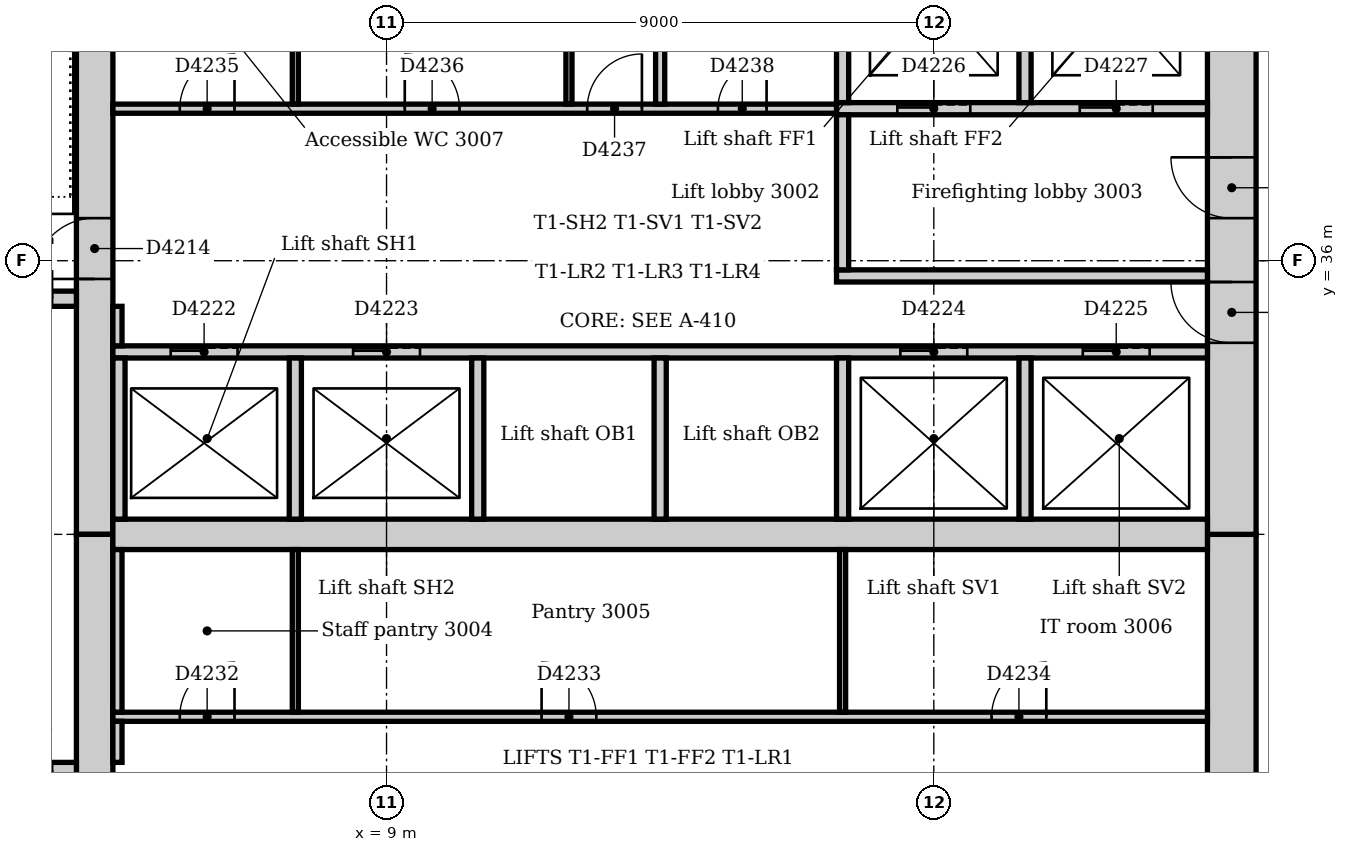
"""IFC4 building model, lengths in metres.
Left out: names, types, materials, properties, quantities, classifications, styles, units other than length and angle.
Written with IfcOpenShell. Run it as: python <this file> out.ifc"""

import sys

from ifc_helpers import new_model, si_unit, direction, frame, frame_2d, origin, place, context, subcontext, project, spatial, rectangle, extrude, element, fill, save


model = new_model("IFC4")
c1 = context("Model", 3, precision=1e-05, world=origin(), true_north=direction((0.0, 1.0)))
c2 = subcontext(c1, "Body", "Model", "MODEL_VIEW")
j1 = project(units=[si_unit("LENGTHUNIT", "METRE"), si_unit("PLANEANGLEUNIT", "RADIAN")], contexts=[c1])
p1 = place(None, origin())
s1 = spatial("IfcSite", under=j1, at=p1, CompositionType="ELEMENT")
p2 = place(p1, origin())
s2 = spatial("IfcBuilding", under=s1, at=p2, CompositionType="ELEMENT")
p3 = place(p2, frame((0.0, 0.0, 128.0)))
s3 = spatial("IfcBuildingStorey", under=s2, at=p3, CompositionType="ELEMENT", Elevation=128.0)
p4 = place(p3, frame((22.9, 21.0, 0.0), z_axis=(0.0, 0.0, 1.0), x_axis=(0.0, 1.0, 0.0)))
e1 = element("IfcWall", 1, at=p4, inside=s3, PredefinedType="SOLIDWALL", context=c2, shape_type="SweptSolid", body=[
    extrude(rectangle(XDim=10.5, YDim=0.8, at=frame_2d((5.25, 0.0))), origin(), (0.0, 0.0, 1.0), 4.0),
])
p5 = place(p4, frame((4.35, 0.0, 0.0)))
e2 = element("IfcOpeningElement", 2, at=p5, cuts=e1, PredefinedType="OPENING", context=c2, shape_type="SweptSolid", body=[
    extrude(rectangle(XDim=1.8, YDim=2.1, at=frame_2d((0.9, 1.05))), frame((0.0, 0.41, 0.0), z_axis=(0.0, -1.0, 0.0), x_axis=(1.0, 0.0, 0.0)), (0.0, 0.0, 1.0), 0.82),
])
p6 = place(p3, frame((22.9, 31.5, 0.0), z_axis=(0.0, 0.0, 1.0), x_axis=(0.0, 1.0, 0.0)))
e3 = element("IfcWall", 3, at=p6, inside=s3, PredefinedType="SOLIDWALL", context=c2, shape_type="SweptSolid", body=[
    extrude(rectangle(XDim=10.5, YDim=0.8, at=frame_2d((5.25, 0.0))), origin(), (0.0, 0.0, 1.0), 4.0),
])
p7 = place(p6, frame((3.15, 0.0, 0.0)))
e4 = element("IfcOpeningElement", 4, at=p7, cuts=e3, PredefinedType="OPENING", context=c2, shape_type="SweptSolid", body=[
    extrude(rectangle(XDim=1.0, YDim=2.1, at=frame_2d((0.5, 1.05))), frame((0.0, 0.41, 0.0), z_axis=(0.0, -1.0, 0.0), x_axis=(1.0, 0.0, 0.0)), (0.0, 0.0, 1.0), 0.82),
])
p8 = place(p6, frame((5.2, 0.0, 0.0)))
e5 = element("IfcOpeningElement", 5, at=p8, cuts=e3, PredefinedType="OPENING", context=c2, shape_type="SweptSolid", body=[
    extrude(rectangle(XDim=1.0, YDim=2.1, at=frame_2d((0.5, 1.05))), frame((0.0, 0.41, 0.0), z_axis=(0.0, -1.0, 0.0), x_axis=(1.0, 0.0, 0.0)), (0.0, 0.0, 1.0), 0.82),
])
p9 = place(p3, frame((4.2, 42.0, 0.0), z_axis=(0.0, 0.0, 1.0), x_axis=(0.0, -1.0, 0.0)))
e6 = element("IfcWall", 6, at=p9, inside=s3, PredefinedType="SOLIDWALL", context=c2, shape_type="SweptSolid", body=[
    extrude(rectangle(XDim=10.5, YDim=0.6, at=frame_2d((5.25, 0.0))), origin(), (0.0, 0.0, 1.0), 4.0),
])
p10 = place(p9, frame((5.3, 0.0, 0.0)))
e7 = element("IfcOpeningElement", 7, at=p10, cuts=e6, PredefinedType="OPENING", context=c2, shape_type="SweptSolid", body=[
    extrude(rectangle(XDim=1.0, YDim=2.1, at=frame_2d((0.5, 1.05))), frame((0.0, 0.31, 0.0), z_axis=(0.0, -1.0, 0.0), x_axis=(1.0, 0.0, 0.0)), (0.0, 0.0, 1.0), 0.62),
])
p11 = place(p3, frame((4.2, 31.5, 0.0), z_axis=(0.0, 0.0, 1.0), x_axis=(0.0, -1.0, 0.0)))
e8 = element("IfcWall", 8, at=p11, inside=s3, PredefinedType="SOLIDWALL", context=c2, shape_type="SweptSolid", body=[
    extrude(rectangle(XDim=10.5, YDim=0.6, at=frame_2d((5.25, 0.0))), origin(), (0.0, 0.0, 1.0), 4.0),
])
p12 = place(p11, frame((4.25, 0.0, 0.0)))
e9 = element("IfcOpeningElement", 9, at=p12, cuts=e8, PredefinedType="OPENING", context=c2, shape_type="SweptSolid", body=[
    extrude(rectangle(XDim=1.0, YDim=2.1, at=frame_2d((0.5, 1.05))), frame((0.0, 0.31, 0.0), z_axis=(0.0, -1.0, 0.0), x_axis=(1.0, 0.0, 0.0)), (0.0, 0.0, 1.0), 0.62),
])
p13 = place(p3, frame((4.5, 31.5, 0.0), z_axis=(0.0, 0.0, 1.0), x_axis=(1.0, 0.0, 0.0)))
e10 = element("IfcWall", 10, at=p13, inside=s3, PredefinedType="SOLIDWALL", context=c2, shape_type="SweptSolid", body=[
    extrude(rectangle(XDim=18.0, YDim=0.5, at=frame_2d((9.0, 0.0))), origin(), (0.0, 0.0, 1.0), 4.0),
])
p14 = place(p3, frame((3.9, 27.625, 0.0), z_axis=(0.0, 0.0, 1.0), x_axis=(-1.0, 0.0, 0.0)))
e11 = element("IfcWall", 11, at=p14, inside=s3, PredefinedType="SOLIDWALL", context=c2, shape_type="SweptSolid", body=[
    extrude(rectangle(XDim=3.54, YDim=0.25, at=frame_2d((1.77, 0.0))), origin(), (0.0, 0.0, 1.0), 4.0),
])
p15 = place(p14, frame((0.4, 0.0, 0.0)))
e12 = element("IfcOpeningElement", 12, at=p15, cuts=e11, PredefinedType="OPENING", context=c2, shape_type="SweptSolid", body=[
    extrude(rectangle(XDim=1.0, YDim=2.1, at=frame_2d((0.5, 1.05))), frame((0.0, 0.135, 0.0), z_axis=(0.0, -1.0, 0.0), x_axis=(1.0, 0.0, 0.0)), (0.0, 0.0, 1.0), 0.27),
])
p16 = place(p3, frame((0.36, 35.375, 0.0), z_axis=(0.0, 0.0, 1.0), x_axis=(1.0, 0.0, 0.0)))
e13 = element("IfcWall", 13, at=p16, inside=s3, PredefinedType="SOLIDWALL", context=c2, shape_type="SweptSolid", body=[
    extrude(rectangle(XDim=3.54, YDim=0.25, at=frame_2d((1.77, 0.0))), origin(), (0.0, 0.0, 1.0), 4.0),
])
p17 = place(p16, frame((2.14, 0.0, 0.0)))
e14 = element("IfcOpeningElement", 14, at=p17, cuts=e13, PredefinedType="OPENING", context=c2, shape_type="SweptSolid", body=[
    extrude(rectangle(XDim=1.0, YDim=2.1, at=frame_2d((0.5, 1.05))), frame((0.0, 0.135, 0.0), z_axis=(0.0, -1.0, 0.0), x_axis=(1.0, 0.0, 0.0)), (0.0, 0.0, 1.0), 0.27),
])
p18 = place(p3, frame((16.4, 35.75, 0.0), z_axis=(0.0, 0.0, 1.0), x_axis=(1.0, 0.0, 0.0)))
e15 = element("IfcWall", 15, at=p18, inside=s3, PredefinedType="PARTITIONING", context=c2, shape_type="SweptSolid", body=[
    extrude(rectangle(XDim=6.1, YDim=0.2, at=frame_2d((3.05, 0.0))), origin(), (0.0, 0.0, 1.0), 3.85),
])
p19 = place(p3, frame((16.4, 38.5, 0.0), z_axis=(0.0, 0.0, 1.0), x_axis=(1.0, 0.0, 0.0)))
e16 = element("IfcWall", 16, at=p19, inside=s3, PredefinedType="PARTITIONING", context=c2, shape_type="SweptSolid", body=[
    extrude(rectangle(XDim=6.1, YDim=0.2, at=frame_2d((3.05, 0.0))), origin(), (0.0, 0.0, 1.0), 3.85),
])
p20 = place(p19, frame((1.0, 0.0, 0.0)))
e17 = element("IfcOpeningElement", 17, at=p20, cuts=e16, PredefinedType="OPENING", context=c2, shape_type="SweptSolid", body=[
    extrude(rectangle(XDim=1.2, YDim=2.1, at=frame_2d((0.6, 1.05))), frame((0.0, 0.11, 0.0), z_axis=(0.0, -1.0, 0.0), x_axis=(1.0, 0.0, 0.0)), (0.0, 0.0, 1.0), 0.22),
])
p21 = place(p19, frame((4.0, 0.0, 0.0)))
e18 = element("IfcOpeningElement", 18, at=p21, cuts=e16, PredefinedType="OPENING", context=c2, shape_type="SweptSolid", body=[
    extrude(rectangle(XDim=1.2, YDim=2.1, at=frame_2d((0.6, 1.05))), frame((0.0, 0.11, 0.0), z_axis=(0.0, -1.0, 0.0), x_axis=(1.0, 0.0, 0.0)), (0.0, 0.0, 1.0), 0.22),
])
p22 = place(p3, frame((16.5, 35.85, 0.0), z_axis=(0.0, 0.0, 1.0), x_axis=(0.0, 1.0, 0.0)))
e19 = element("IfcWall", 19, at=p22, inside=s3, PredefinedType="PARTITIONING", context=c2, shape_type="SweptSolid", body=[
    extrude(rectangle(XDim=2.55, YDim=0.2, at=frame_2d((1.275, 0.0))), origin(), (0.0, 0.0, 1.0), 3.85),
])
p23 = place(p3, frame((4.5, 34.5, 0.0), z_axis=(0.0, 0.0, 1.0), x_axis=(1.0, 0.0, 0.0)))
e20 = element("IfcWall", 20, at=p23, inside=s3, PredefinedType="PARTITIONING", context=c2, shape_type="SweptSolid", body=[
    extrude(rectangle(XDim=18.0, YDim=0.2, at=frame_2d((9.0, 0.0))), origin(), (0.0, 0.0, 1.0), 3.85),
])
p24 = place(p23, frame((0.95, 0.0, 0.0)))
e21 = element("IfcOpeningElement", 21, at=p24, cuts=e20, PredefinedType="OPENING", context=c2, shape_type="SweptSolid", body=[
    extrude(rectangle(XDim=1.1, YDim=2.1, at=frame_2d((0.55, 1.05))), frame((0.0, 0.11, 0.0), z_axis=(0.0, -1.0, 0.0), x_axis=(1.0, 0.0, 0.0)), (0.0, 0.0, 1.0), 0.22),
])
p25 = place(p23, frame((3.95, 0.0, 0.0)))
e22 = element("IfcOpeningElement", 22, at=p25, cuts=e20, PredefinedType="OPENING", context=c2, shape_type="SweptSolid", body=[
    extrude(rectangle(XDim=1.1, YDim=2.1, at=frame_2d((0.55, 1.05))), frame((0.0, 0.11, 0.0), z_axis=(0.0, -1.0, 0.0), x_axis=(1.0, 0.0, 0.0)), (0.0, 0.0, 1.0), 0.22),
])
p26 = place(p23, frame((12.95, 0.0, 0.0)))
e23 = element("IfcOpeningElement", 23, at=p26, cuts=e20, PredefinedType="OPENING", context=c2, shape_type="SweptSolid", body=[
    extrude(rectangle(XDim=1.1, YDim=2.1, at=frame_2d((0.55, 1.05))), frame((0.0, 0.11, 0.0), z_axis=(0.0, -1.0, 0.0), x_axis=(1.0, 0.0, 0.0)), (0.0, 0.0, 1.0), 0.22),
])
p27 = place(p23, frame((15.95, 0.0, 0.0)))
e24 = element("IfcOpeningElement", 24, at=p27, cuts=e20, PredefinedType="OPENING", context=c2, shape_type="SweptSolid", body=[
    extrude(rectangle(XDim=1.1, YDim=2.1, at=frame_2d((0.55, 1.05))), frame((0.0, 0.11, 0.0), z_axis=(0.0, -1.0, 0.0), x_axis=(1.0, 0.0, 0.0)), (0.0, 0.0, 1.0), 0.22),
])
for number, where, z_axis, x_axis in (
    (25, (16.5, 38.6, 0.0), (0.0, 0.0, 1.0), (0.0, 1.0, 0.0)),
    (26, (19.5, 38.6, 0.0), (0.0, 0.0, 1.0), (0.0, 1.0, 0.0)),
):
    element("IfcWall", number, at=place(p3, frame(where, z_axis=z_axis, x_axis=x_axis)), inside=s3, PredefinedType="PARTITIONING", context=c2, shape_type="SweptSolid", body=[
        extrude(rectangle(XDim=3.4, YDim=0.2, at=frame_2d((1.7, 0.0))), origin(), (0.0, 0.0, 1.0), 3.85),
    ])
for number, where, z_axis, x_axis in (
    (27, (4.6, 31.75, 0.0), (0.0, 0.0, 1.0), (0.0, 1.0, 0.0)),
    (28, (7.5, 31.75, 0.0), (0.0, 0.0, 1.0), (0.0, 1.0, 0.0)),
    (29, (10.5, 31.75, 0.0), (0.0, 0.0, 1.0), (0.0, 1.0, 0.0)),
    (30, (13.5, 31.75, 0.0), (0.0, 0.0, 1.0), (0.0, 1.0, 0.0)),
    (31, (16.5, 31.75, 0.0), (0.0, 0.0, 1.0), (0.0, 1.0, 0.0)),
    (32, (19.5, 31.75, 0.0), (0.0, 0.0, 1.0), (0.0, 1.0, 0.0)),
):
    element("IfcWall", number, at=place(p3, frame(where, z_axis=z_axis, x_axis=x_axis)), inside=s3, PredefinedType="PARTITIONING", context=c2, shape_type="SweptSolid", body=[
        extrude(rectangle(XDim=2.65, YDim=0.2, at=frame_2d((1.325, 0.0))), origin(), (0.0, 0.0, 1.0), 3.85),
    ])
p28 = place(p3, frame((4.5, 28.5, 0.0), z_axis=(0.0, 0.0, 1.0), x_axis=(1.0, 0.0, 0.0)))
e33 = element("IfcWall", 33, at=p28, inside=s3, PredefinedType="PARTITIONING", context=c2, shape_type="SweptSolid", body=[
    extrude(rectangle(XDim=18.0, YDim=0.15, at=frame_2d((9.0, 0.0))), origin(), (0.0, 0.0, 1.0), 3.85),
])
p29 = place(p28, frame((1.1, 0.0, 0.0)))
e34 = element("IfcOpeningElement", 34, at=p29, cuts=e33, PredefinedType="OPENING", context=c2, shape_type="SweptSolid", body=[
    extrude(rectangle(XDim=0.9, YDim=2.1, at=frame_2d((0.45, 1.05))), frame((0.0, 0.085, 0.0), z_axis=(0.0, -1.0, 0.0), x_axis=(1.0, 0.0, 0.0)), (0.0, 0.0, 1.0), 0.17),
])
p30 = place(p28, frame((7.05, 0.0, 0.0)))
e35 = element("IfcOpeningElement", 35, at=p30, cuts=e33, PredefinedType="OPENING", context=c2, shape_type="SweptSolid", body=[
    extrude(rectangle(XDim=0.9, YDim=2.1, at=frame_2d((0.45, 1.05))), frame((0.0, 0.085, 0.0), z_axis=(0.0, -1.0, 0.0), x_axis=(1.0, 0.0, 0.0)), (0.0, 0.0, 1.0), 0.17),
])
p31 = place(p28, frame((14.45, 0.0, 0.0)))
e36 = element("IfcOpeningElement", 36, at=p31, cuts=e33, PredefinedType="OPENING", context=c2, shape_type="SweptSolid", body=[
    extrude(rectangle(XDim=0.9, YDim=2.1, at=frame_2d((0.45, 1.05))), frame((0.0, 0.085, 0.0), z_axis=(0.0, -1.0, 0.0), x_axis=(1.0, 0.0, 0.0)), (0.0, 0.0, 1.0), 0.17),
])
p32 = place(p3, frame((4.5, 38.5, 0.0), z_axis=(0.0, 0.0, 1.0), x_axis=(1.0, 0.0, 0.0)))
e37 = element("IfcWall", 37, at=p32, inside=s3, PredefinedType="PARTITIONING", context=c2, shape_type="SweptSolid", body=[
    extrude(rectangle(XDim=11.9, YDim=0.15, at=frame_2d((5.95, 0.0))), origin(), (0.0, 0.0, 1.0), 3.85),
])
p33 = place(p32, frame((1.1, 0.0, 0.0)))
e38 = element("IfcOpeningElement", 38, at=p33, cuts=e37, PredefinedType="OPENING", context=c2, shape_type="SweptSolid", body=[
    extrude(rectangle(XDim=0.9, YDim=2.1, at=frame_2d((0.45, 1.05))), frame((0.0, 0.085, 0.0), z_axis=(0.0, -1.0, 0.0), x_axis=(1.0, 0.0, 0.0)), (0.0, 0.0, 1.0), 0.17),
])
p34 = place(p32, frame((4.8, 0.0, 0.0)))
e39 = element("IfcOpeningElement", 39, at=p34, cuts=e37, PredefinedType="OPENING", context=c2, shape_type="SweptSolid", body=[
    extrude(rectangle(XDim=0.9, YDim=2.1, at=frame_2d((0.45, 1.05))), frame((0.0, 0.085, 0.0), z_axis=(0.0, -1.0, 0.0), x_axis=(1.0, 0.0, 0.0)), (0.0, 0.0, 1.0), 0.17),
])
p35 = place(p32, frame((7.8, 0.0, 0.0)))
e40 = element("IfcOpeningElement", 40, at=p35, cuts=e37, PredefinedType="OPENING", context=c2, shape_type="SweptSolid", body=[
    extrude(rectangle(XDim=0.9, YDim=2.1, at=frame_2d((0.45, 1.05))), frame((0.0, 0.085, 0.0), z_axis=(0.0, -1.0, 0.0), x_axis=(1.0, 0.0, 0.0)), (0.0, 0.0, 1.0), 0.17),
])
p36 = place(p32, frame((9.95, 0.0, 0.0)))
e41 = element("IfcOpeningElement", 41, at=p36, cuts=e37, PredefinedType="OPENING", context=c2, shape_type="SweptSolid", body=[
    extrude(rectangle(XDim=0.8, YDim=2.1, at=frame_2d((0.4, 1.05))), frame((0.0, 0.085, 0.0), z_axis=(0.0, -1.0, 0.0), x_axis=(1.0, 0.0, 0.0)), (0.0, 0.0, 1.0), 0.17),
])
p37 = place(p3, frame((4.575, 27.75, 0.0), z_axis=(0.0, 0.0, 1.0), x_axis=(0.0, 1.0, 0.0)))
e42 = element("IfcWall", 42, at=p37, inside=s3, PredefinedType="PARTITIONING", context=c2, shape_type="SweptSolid", body=[
    extrude(rectangle(XDim=0.675, YDim=0.15, at=frame_2d((0.338, 0.0))), origin(), (0.0, 0.0, 1.0), 3.85),
])
p38 = place(p3, frame((4.575, 28.575, 0.0), z_axis=(0.0, 0.0, 1.0), x_axis=(0.0, 1.0, 0.0)))
e43 = element("IfcWall", 43, at=p38, inside=s3, PredefinedType="PARTITIONING", context=c2, shape_type="SweptSolid", body=[
    extrude(rectangle(XDim=2.675, YDim=0.15, at=frame_2d((1.337, 0.0))), origin(), (0.0, 0.0, 1.0), 3.85),
])
p39 = place(p3, frame((4.575, 34.6, 0.0), z_axis=(0.0, 0.0, 1.0), x_axis=(0.0, 1.0, 0.0)))
e44 = element("IfcWall", 44, at=p39, inside=s3, PredefinedType="PARTITIONING", context=c2, shape_type="SweptSolid", body=[
    extrude(rectangle(XDim=0.65, YDim=0.15, at=frame_2d((0.325, 0.0))), origin(), (0.0, 0.0, 1.0), 3.85),
])
p40 = place(p3, frame((13.5, 38.575, 0.0), z_axis=(0.0, 0.0, 1.0), x_axis=(0.0, 1.0, 0.0)))
e45 = element("IfcWall", 45, at=p40, inside=s3, PredefinedType="PARTITIONING", context=c2, shape_type="SweptSolid", body=[
    extrude(rectangle(XDim=3.425, YDim=0.15, at=frame_2d((1.712, 0.0))), origin(), (0.0, 0.0, 1.0), 3.85),
])
for number, where, z_axis, x_axis in (
    (46, (7.5, 38.575, 0.0), (0.0, 0.0, 1.0), (0.0, 1.0, 0.0)),
    (47, (12.0, 38.575, 0.0), (0.0, 0.0, 1.0), (0.0, 1.0, 0.0)),
):
    element("IfcWall", number, at=place(p3, frame(where, z_axis=z_axis, x_axis=x_axis)), inside=s3, PredefinedType="PARTITIONING", context=c2, shape_type="SweptSolid", body=[
        extrude(rectangle(XDim=3.425, YDim=0.1, at=frame_2d((1.712, 0.0))), origin(), (0.0, 0.0, 1.0), 3.85),
    ])
for number, where, z_axis, x_axis in (
    (48, (7.5, 28.575, 0.0), (0.0, 0.0, 1.0), (0.0, 1.0, 0.0)),
    (49, (16.5, 28.575, 0.0), (0.0, 0.0, 1.0), (0.0, 1.0, 0.0)),
):
    element("IfcWall", number, at=place(p3, frame(where, z_axis=z_axis, x_axis=x_axis)), inside=s3, PredefinedType="PARTITIONING", context=c2, shape_type="SweptSolid", body=[
        extrude(rectangle(XDim=2.675, YDim=0.1, at=frame_2d((1.337, 0.0))), origin(), (0.0, 0.0, 1.0), 3.85),
    ])
p41 = place(p10, frame((1.0, 0.0, 0.0), z_axis=(0.0, 0.0, 1.0), x_axis=(-1.0, 0.0, 0.0)))
e50 = element("IfcDoor", 50, at=p41, inside=s3, OperationType="SINGLE_SWING_LEFT", PredefinedType="DOOR", context=c2, shape_type="SweptSolid", body=[
    extrude(rectangle(XDim=1.0, YDim=2.1, at=frame_2d((0.5, 1.05))), frame((0.0, 0.025, 0.0), z_axis=(0.0, -1.0, 0.0), x_axis=(1.0, 0.0, 0.0)), (0.0, 0.0, 1.0), 0.05),
])
fill(e7, e50)
p42 = place(p24, origin())
e51 = element("IfcDoor", 51, at=p42, inside=s3, OperationType="SLIDING_TO_LEFT", PredefinedType="DOOR", context=c2, shape_type="SweptSolid", body=[
    extrude(rectangle(XDim=1.1, YDim=2.1, at=frame_2d((0.55, 1.05))), frame((0.0, 0.025, 0.0), z_axis=(0.0, -1.0, 0.0), x_axis=(1.0, 0.0, 0.0)), (0.0, 0.0, 1.0), 0.05),
])
fill(e21, e51)
p43 = place(p25, origin())
e52 = element("IfcDoor", 52, at=p43, inside=s3, OperationType="SLIDING_TO_LEFT", PredefinedType="DOOR", context=c2, shape_type="SweptSolid", body=[
    extrude(rectangle(XDim=1.1, YDim=2.1, at=frame_2d((0.55, 1.05))), frame((0.0, 0.025, 0.0), z_axis=(0.0, -1.0, 0.0), x_axis=(1.0, 0.0, 0.0)), (0.0, 0.0, 1.0), 0.05),
])
fill(e22, e52)
p44 = place(p26, origin())
e53 = element("IfcDoor", 53, at=p44, inside=s3, OperationType="SLIDING_TO_LEFT", PredefinedType="DOOR", context=c2, shape_type="SweptSolid", body=[
    extrude(rectangle(XDim=1.1, YDim=2.1, at=frame_2d((0.55, 1.05))), frame((0.0, 0.025, 0.0), z_axis=(0.0, -1.0, 0.0), x_axis=(1.0, 0.0, 0.0)), (0.0, 0.0, 1.0), 0.05),
])
fill(e23, e53)
p45 = place(p27, origin())
e54 = element("IfcDoor", 54, at=p45, inside=s3, OperationType="SLIDING_TO_LEFT", PredefinedType="DOOR", context=c2, shape_type="SweptSolid", body=[
    extrude(rectangle(XDim=1.1, YDim=2.1, at=frame_2d((0.55, 1.05))), frame((0.0, 0.025, 0.0), z_axis=(0.0, -1.0, 0.0), x_axis=(1.0, 0.0, 0.0)), (0.0, 0.0, 1.0), 0.05),
])
fill(e24, e54)
p46 = place(p20, origin())
e55 = element("IfcDoor", 55, at=p46, inside=s3, OperationType="SLIDING_TO_LEFT", PredefinedType="DOOR", context=c2, shape_type="SweptSolid", body=[
    extrude(rectangle(XDim=1.2, YDim=2.1, at=frame_2d((0.6, 1.05))), frame((0.0, 0.025, 0.0), z_axis=(0.0, -1.0, 0.0), x_axis=(1.0, 0.0, 0.0)), (0.0, 0.0, 1.0), 0.05),
])
fill(e17, e55)
p47 = place(p21, origin())
e56 = element("IfcDoor", 56, at=p47, inside=s3, OperationType="SLIDING_TO_LEFT", PredefinedType="DOOR", context=c2, shape_type="SweptSolid", body=[
    extrude(rectangle(XDim=1.2, YDim=2.1, at=frame_2d((0.6, 1.05))), frame((0.0, 0.025, 0.0), z_axis=(0.0, -1.0, 0.0), x_axis=(1.0, 0.0, 0.0)), (0.0, 0.0, 1.0), 0.05),
])
fill(e18, e56)
p48 = place(p7, origin())
e57 = element("IfcDoor", 57, at=p48, inside=s3, OperationType="SINGLE_SWING_RIGHT", PredefinedType="DOOR", context=c2, shape_type="SweptSolid", body=[
    extrude(rectangle(XDim=1.0, YDim=2.1, at=frame_2d((0.5, 1.05))), frame((0.0, 0.025, 0.0), z_axis=(0.0, -1.0, 0.0), x_axis=(1.0, 0.0, 0.0)), (0.0, 0.0, 1.0), 0.05),
])
fill(e4, e57)
p49 = place(p8, origin())
e58 = element("IfcDoor", 58, at=p49, inside=s3, OperationType="SINGLE_SWING_RIGHT", PredefinedType="DOOR", context=c2, shape_type="SweptSolid", body=[
    extrude(rectangle(XDim=1.0, YDim=2.1, at=frame_2d((0.5, 1.05))), frame((0.0, 0.025, 0.0), z_axis=(0.0, -1.0, 0.0), x_axis=(1.0, 0.0, 0.0)), (0.0, 0.0, 1.0), 0.05),
])
fill(e5, e58)
p50 = place(p29, origin())
e59 = element("IfcDoor", 59, at=p50, inside=s3, OperationType="SINGLE_SWING_RIGHT", PredefinedType="DOOR", context=c2, shape_type="SweptSolid", body=[
    extrude(rectangle(XDim=0.9, YDim=2.1, at=frame_2d((0.45, 1.05))), frame((0.0, 0.025, 0.0), z_axis=(0.0, -1.0, 0.0), x_axis=(1.0, 0.0, 0.0)), (0.0, 0.0, 1.0), 0.05),
])
fill(e34, e59)
p51 = place(p30, origin())
e60 = element("IfcDoor", 60, at=p51, inside=s3, OperationType="SINGLE_SWING_LEFT", PredefinedType="DOOR", context=c2, shape_type="SweptSolid", body=[
    extrude(rectangle(XDim=0.9, YDim=2.1, at=frame_2d((0.45, 1.05))), frame((0.0, 0.025, 0.0), z_axis=(0.0, -1.0, 0.0), x_axis=(1.0, 0.0, 0.0)), (0.0, 0.0, 1.0), 0.05),
])
fill(e35, e60)
p52 = place(p31, origin())
e61 = element("IfcDoor", 61, at=p52, inside=s3, OperationType="SINGLE_SWING_RIGHT", PredefinedType="DOOR", context=c2, shape_type="SweptSolid", body=[
    extrude(rectangle(XDim=0.9, YDim=2.1, at=frame_2d((0.45, 1.05))), frame((0.0, 0.025, 0.0), z_axis=(0.0, -1.0, 0.0), x_axis=(1.0, 0.0, 0.0)), (0.0, 0.0, 1.0), 0.05),
])
fill(e36, e61)
p53 = place(p33, origin())
e62 = element("IfcDoor", 62, at=p53, inside=s3, OperationType="SINGLE_SWING_RIGHT", PredefinedType="DOOR", context=c2, shape_type="SweptSolid", body=[
    extrude(rectangle(XDim=0.9, YDim=2.1, at=frame_2d((0.45, 1.05))), frame((0.0, 0.025, 0.0), z_axis=(0.0, -1.0, 0.0), x_axis=(1.0, 0.0, 0.0)), (0.0, 0.0, 1.0), 0.05),
])
fill(e38, e62)
p54 = place(p34, origin())
e63 = element("IfcDoor", 63, at=p54, inside=s3, OperationType="SINGLE_SWING_LEFT", PredefinedType="DOOR", context=c2, shape_type="SweptSolid", body=[
    extrude(rectangle(XDim=0.9, YDim=2.1, at=frame_2d((0.45, 1.05))), frame((0.0, 0.025, 0.0), z_axis=(0.0, -1.0, 0.0), x_axis=(1.0, 0.0, 0.0)), (0.0, 0.0, 1.0), 0.05),
])
fill(e39, e63)
p55 = place(p35, origin())
e64 = element("IfcDoor", 64, at=p55, inside=s3, OperationType="SINGLE_SWING_RIGHT", PredefinedType="DOOR", context=c2, shape_type="SweptSolid", body=[
    extrude(rectangle(XDim=0.9, YDim=2.1, at=frame_2d((0.45, 1.05))), frame((0.0, 0.025, 0.0), z_axis=(0.0, -1.0, 0.0), x_axis=(1.0, 0.0, 0.0)), (0.0, 0.0, 1.0), 0.05),
])
fill(e40, e64)
p56 = place(p36, origin())
e65 = element("IfcDoor", 65, at=p56, inside=s3, OperationType="SINGLE_SWING_RIGHT", PredefinedType="DOOR", context=c2, shape_type="SweptSolid", body=[
    extrude(rectangle(XDim=0.8, YDim=2.1, at=frame_2d((0.4, 1.05))), frame((0.0, 0.025, 0.0), z_axis=(0.0, -1.0, 0.0), x_axis=(1.0, 0.0, 0.0)), (0.0, 0.0, 1.0), 0.05),
])
fill(e41, e65)
save(model, sys.argv[1])
